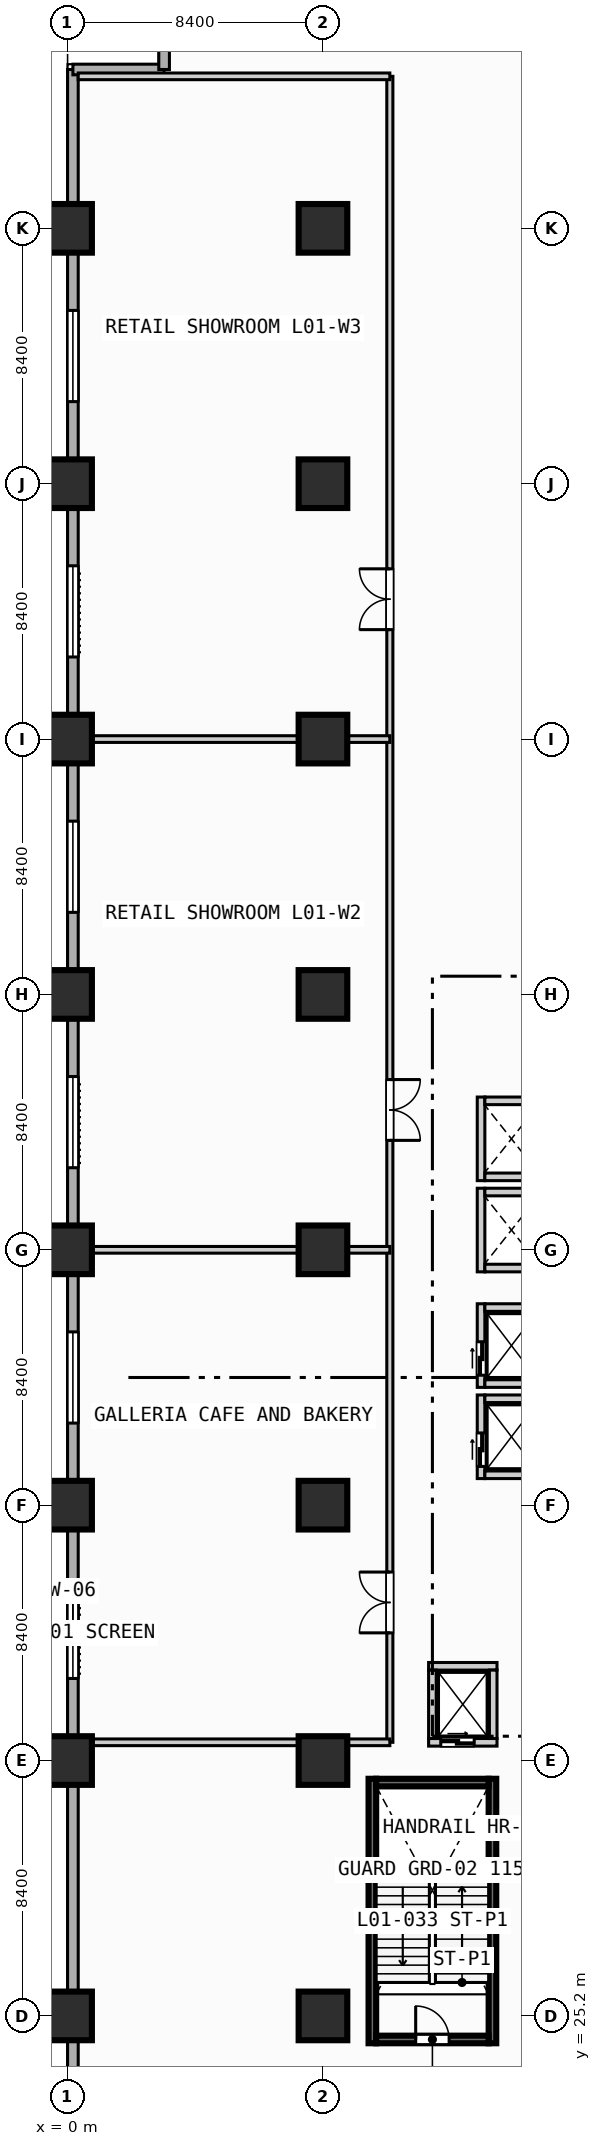
"""IFC4 building model, lengths in metres.
Left out: names, types, materials, properties, quantities, classifications, styles, units other than length and angle.
Written with IfcOpenShell. Run it as: python <this file> out.ifc"""

import sys

from ifc_helpers import new_model, si_unit, direction, frame, frame_2d, origin, origin_2d, place, context, subcontext, project, spatial, rectangle, extrude, element, fill, save


model = new_model("IFC4")
c1 = context("Model", 3, precision=1e-05, world=origin(), true_north=direction((0.0, 1.0)))
c2 = subcontext(c1, "Body", "Model", "MODEL_VIEW")
j1 = project(units=[si_unit("LENGTHUNIT", "METRE"), si_unit("PLANEANGLEUNIT", "RADIAN")], contexts=[c1])
p1 = place(None, origin())
s1 = spatial("IfcSite", under=j1, at=p1, CompositionType="ELEMENT")
p2 = place(p1, origin())
s2 = spatial("IfcBuilding", under=s1, at=p2, CompositionType="ELEMENT")
p3 = place(p2, frame((0.0, 0.0, 6.0)))
s3 = spatial("IfcBuildingStorey", under=s2, at=p3, CompositionType="ELEMENT", Elevation=6.0)
for number, where, z_axis, x_axis in (
    (1, (10.025, 24.3, 0.0), (0.0, 0.0, 1.0), (0.0, 1.0, 0.0)),
    (2, (13.975, 24.3, 0.0), (0.0, 0.0, 1.0), (0.0, 1.0, 0.0)),
):
    element("IfcWall", number, at=place(p3, frame(where, z_axis=z_axis, x_axis=x_axis)), inside=s3, PredefinedType="SOLIDWALL", context=c2, shape_type="SweptSolid", body=[
        extrude(rectangle(XDim=8.7, YDim=0.25, at=frame_2d((4.35, 0.0))), origin(), (0.0, 0.0, 1.0), 4.45),
    ])
p4 = place(p3, frame((10.15, 32.875, 0.0), z_axis=(0.0, 0.0, 1.0), x_axis=(1.0, 0.0, 0.0)))
e3 = element("IfcWall", 3, at=p4, inside=s3, PredefinedType="SOLIDWALL", context=c2, shape_type="SweptSolid", body=[
    extrude(rectangle(XDim=3.7, YDim=0.25, at=frame_2d((1.85, 0.0))), origin(), (0.0, 0.0, 1.0), 4.45),
])
for number, where, z_axis, x_axis in (
    (4, (0.0, 25.2, 0.0), (0.0, 0.0, 1.0), (1.0, 0.0, 0.0)),
    (5, (0.0, 33.6, 0.0), (0.0, 0.0, 1.0), (1.0, 0.0, 0.0)),
    (6, (0.0, 42.0, 0.0), (0.0, 0.0, 1.0), (1.0, 0.0, 0.0)),
    (7, (0.0, 50.4, 0.0), (0.0, 0.0, 1.0), (1.0, 0.0, 0.0)),
    (8, (0.0, 58.8, 0.0), (0.0, 0.0, 1.0), (1.0, 0.0, 0.0)),
    (9, (0.0, 67.2, 0.0), (0.0, 0.0, 1.0), (1.0, 0.0, 0.0)),
    (10, (0.0, 75.6, 0.0), (0.0, 0.0, 1.0), (1.0, 0.0, 0.0)),
    (11, (0.0, 84.0, 0.0), (0.0, 0.0, 1.0), (1.0, 0.0, 0.0)),
    (12, (8.4, 25.2, 0.0), (0.0, 0.0, 1.0), (1.0, 0.0, 0.0)),
    (13, (8.4, 33.6, 0.0), (0.0, 0.0, 1.0), (1.0, 0.0, 0.0)),
    (14, (8.4, 42.0, 0.0), (0.0, 0.0, 1.0), (1.0, 0.0, 0.0)),
    (15, (8.4, 50.4, 0.0), (0.0, 0.0, 1.0), (1.0, 0.0, 0.0)),
    (16, (8.4, 58.8, 0.0), (0.0, 0.0, 1.0), (1.0, 0.0, 0.0)),
    (17, (8.4, 67.2, 0.0), (0.0, 0.0, 1.0), (1.0, 0.0, 0.0)),
    (18, (8.4, 75.6, 0.0), (0.0, 0.0, 1.0), (1.0, 0.0, 0.0)),
    (19, (8.4, 84.0, 0.0), (0.0, 0.0, 1.0), (1.0, 0.0, 0.0)),
):
    element("IfcColumn", number, at=place(p3, frame(where, z_axis=z_axis, x_axis=x_axis)), inside=s3, PredefinedType="COLUMN", context=c2, shape_type="SweptSolid", body=[
        extrude(rectangle(XDim=1.6, YDim=1.6, at=origin_2d()), origin(), (0.0, 0.0, 1.0), 4.8),
    ])
p5 = place(p3, frame((0.175, 3.175, 0.0), z_axis=(0.0, 0.0, 1.0), x_axis=(0.0, 1.0, 0.0)))
e20 = element("IfcWall", 20, at=p5, inside=s3, PredefinedType="STANDARD", context=c2, shape_type="SweptSolid", body=[
    extrude(rectangle(XDim=86.05, YDim=0.35, at=frame_2d((43.025, 0.0))), origin(), (0.0, 0.0, 1.0), 4.45),
])
p6 = place(p5, frame((33.125, 0.0, 0.85)))
e21 = element("IfcOpeningElement", 21, at=p6, cuts=e20, PredefinedType="OPENING", context=c2, shape_type="SweptSolid", body=[
    extrude(rectangle(XDim=3.0, YDim=2.4, at=frame_2d((1.5, 1.2))), frame((0.0, 0.185, 0.0), z_axis=(0.0, -1.0, 0.0), x_axis=(1.0, 0.0, 0.0)), (0.0, 0.0, 1.0), 0.37),
])
p7 = place(p5, frame((41.525, 0.0, 0.85)))
e22 = element("IfcOpeningElement", 22, at=p7, cuts=e20, PredefinedType="OPENING", context=c2, shape_type="SweptSolid", body=[
    extrude(rectangle(XDim=3.0, YDim=2.4, at=frame_2d((1.5, 1.2))), frame((0.0, 0.185, 0.0), z_axis=(0.0, -1.0, 0.0), x_axis=(1.0, 0.0, 0.0)), (0.0, 0.0, 1.0), 0.37),
])
p8 = place(p5, frame((49.925, 0.0, 0.85)))
e23 = element("IfcOpeningElement", 23, at=p8, cuts=e20, PredefinedType="OPENING", context=c2, shape_type="SweptSolid", body=[
    extrude(rectangle(XDim=3.0, YDim=2.4, at=frame_2d((1.5, 1.2))), frame((0.0, 0.185, 0.0), z_axis=(0.0, -1.0, 0.0), x_axis=(1.0, 0.0, 0.0)), (0.0, 0.0, 1.0), 0.37),
])
p9 = place(p5, frame((58.325, 0.0, 0.85)))
e24 = element("IfcOpeningElement", 24, at=p9, cuts=e20, PredefinedType="OPENING", context=c2, shape_type="SweptSolid", body=[
    extrude(rectangle(XDim=3.0, YDim=2.4, at=frame_2d((1.5, 1.2))), frame((0.0, 0.185, 0.0), z_axis=(0.0, -1.0, 0.0), x_axis=(1.0, 0.0, 0.0)), (0.0, 0.0, 1.0), 0.37),
])
p10 = place(p5, frame((66.725, 0.0, 0.85)))
e25 = element("IfcOpeningElement", 25, at=p10, cuts=e20, PredefinedType="OPENING", context=c2, shape_type="SweptSolid", body=[
    extrude(rectangle(XDim=3.0, YDim=2.4, at=frame_2d((1.5, 1.2))), frame((0.0, 0.185, 0.0), z_axis=(0.0, -1.0, 0.0), x_axis=(1.0, 0.0, 0.0)), (0.0, 0.0, 1.0), 0.37),
])
p11 = place(p5, frame((75.125, 0.0, 0.85)))
e26 = element("IfcOpeningElement", 26, at=p11, cuts=e20, PredefinedType="OPENING", context=c2, shape_type="SweptSolid", body=[
    extrude(rectangle(XDim=3.0, YDim=2.4, at=frame_2d((1.5, 1.2))), frame((0.0, 0.185, 0.0), z_axis=(0.0, -1.0, 0.0), x_axis=(1.0, 0.0, 0.0)), (0.0, 0.0, 1.0), 0.37),
])
for number, where, z_axis, x_axis in (
    (27, (0.175, 89.225, 0.0), (0.0, 0.0, 1.0), (1.0, 0.0, 0.0)),
    (28, (3.175, 89.225, 0.0), (0.0, 0.0, 1.0), (0.0, 1.0, 0.0)),
):
    element("IfcWall", number, at=place(p3, frame(where, z_axis=z_axis, x_axis=x_axis)), inside=s3, PredefinedType="STANDARD", context=c2, shape_type="SweptSolid", body=[
        extrude(rectangle(XDim=3.0, YDim=0.35, at=frame_2d((1.5, 0.0))), origin(), (0.0, 0.0, 1.0), 4.45),
    ])
p12 = place(p3, frame((11.875, 34.2, 0.0), z_axis=(0.0, 0.0, 1.0), x_axis=(1.0, 0.0, 0.0)))
e29 = element("IfcWall", 29, at=p12, inside=s3, PredefinedType="SOLIDWALL", context=c2, shape_type="SweptSolid", body=[
    extrude(rectangle(XDim=2.25, YDim=0.25, at=frame_2d((1.125, 0.0))), origin(), (0.0, 0.0, 1.0), 4.45),
])
p13 = place(p12, frame((0.4, 0.0, 0.0)))
e30 = element("IfcOpeningElement", 30, at=p13, cuts=e29, PredefinedType="OPENING", context=c2, shape_type="SweptSolid", body=[
    extrude(rectangle(XDim=1.1, YDim=2.15, at=frame_2d((0.55, 1.075))), frame((0.0, 0.135, 0.0), z_axis=(0.0, -1.0, 0.0), x_axis=(1.0, 0.0, 0.0)), (0.0, 0.0, 1.0), 0.27),
])
for number, where, z_axis, x_axis in (
    (31, (11.875, 36.7, 0.0), (0.0, 0.0, 1.0), (1.0, 0.0, 0.0)),
    (32, (12.0, 34.325, 0.0), (0.0, 0.0, 1.0), (0.0, 1.0, 0.0)),
    (33, (14.0, 34.325, 0.0), (0.0, 0.0, 1.0), (0.0, 1.0, 0.0)),
):
    element("IfcWall", number, at=place(p3, frame(where, z_axis=z_axis, x_axis=x_axis)), inside=s3, PredefinedType="SOLIDWALL", context=c2, shape_type="SweptSolid", body=[
        extrude(rectangle(XDim=2.25, YDim=0.25, at=frame_2d((1.125, 0.0))), origin(), (0.0, 0.0, 1.0), 4.45),
    ])
p14 = place(p3, frame((13.6, 42.875, 0.0), z_axis=(0.0, 0.0, 1.0), x_axis=(0.0, 1.0, 0.0)))
e34 = element("IfcWall", 34, at=p14, inside=s3, PredefinedType="SOLIDWALL", context=c2, shape_type="SweptSolid", body=[
    extrude(rectangle(XDim=2.75, YDim=0.25, at=frame_2d((1.375, 0.0))), origin(), (0.0, 0.0, 1.0), 4.45),
])
p15 = place(p14, frame((0.4, 0.0, 0.0)))
e35 = element("IfcOpeningElement", 35, at=p15, cuts=e34, PredefinedType="OPENING", context=c2, shape_type="SweptSolid", body=[
    extrude(rectangle(XDim=1.1, YDim=2.15, at=frame_2d((0.55, 1.075))), frame((0.0, 0.135, 0.0), z_axis=(0.0, -1.0, 0.0), x_axis=(1.0, 0.0, 0.0)), (0.0, 0.0, 1.0), 0.27),
])
for number, where, z_axis, x_axis in (
    (36, (13.725, 43.0, 0.0), (0.0, 0.0, 1.0), (1.0, 0.0, 0.0)),
    (37, (13.725, 45.5, 0.0), (0.0, 0.0, 1.0), (1.0, 0.0, 0.0)),
):
    element("IfcWall", number, at=place(p3, frame(where, z_axis=z_axis, x_axis=x_axis)), inside=s3, PredefinedType="SOLIDWALL", context=c2, shape_type="SweptSolid", body=[
        extrude(rectangle(XDim=1.75, YDim=0.25, at=frame_2d((0.875, 0.0))), origin(), (0.0, 0.0, 1.0), 4.45),
    ])
p16 = place(p3, frame((13.6, 45.875, 0.0), z_axis=(0.0, 0.0, 1.0), x_axis=(0.0, 1.0, 0.0)))
e38 = element("IfcWall", 38, at=p16, inside=s3, PredefinedType="SOLIDWALL", context=c2, shape_type="SweptSolid", body=[
    extrude(rectangle(XDim=2.75, YDim=0.25, at=frame_2d((1.375, 0.0))), origin(), (0.0, 0.0, 1.0), 4.45),
])
p17 = place(p16, frame((0.4, 0.0, 0.0)))
e39 = element("IfcOpeningElement", 39, at=p17, cuts=e38, PredefinedType="OPENING", context=c2, shape_type="SweptSolid", body=[
    extrude(rectangle(XDim=1.1, YDim=2.15, at=frame_2d((0.55, 1.075))), frame((0.0, 0.135, 0.0), z_axis=(0.0, -1.0, 0.0), x_axis=(1.0, 0.0, 0.0)), (0.0, 0.0, 1.0), 0.27),
])
for number, where, z_axis, x_axis in (
    (40, (13.725, 46.0, 0.0), (0.0, 0.0, 1.0), (1.0, 0.0, 0.0)),
    (41, (13.725, 48.5, 0.0), (0.0, 0.0, 1.0), (1.0, 0.0, 0.0)),
):
    element("IfcWall", number, at=place(p3, frame(where, z_axis=z_axis, x_axis=x_axis)), inside=s3, PredefinedType="SOLIDWALL", context=c2, shape_type="SweptSolid", body=[
        extrude(rectangle(XDim=1.75, YDim=0.25, at=frame_2d((0.875, 0.0))), origin(), (0.0, 0.0, 1.0), 4.45),
    ])
p18 = place(p3, frame((13.6, 49.675, 0.0), z_axis=(0.0, 0.0, 1.0), x_axis=(0.0, 1.0, 0.0)))
e42 = element("IfcWall", 42, at=p18, inside=s3, PredefinedType="SOLIDWALL", context=c2, shape_type="SweptSolid", body=[
    extrude(rectangle(XDim=2.75, YDim=0.25, at=frame_2d((1.375, 0.0))), origin(), (0.0, 0.0, 1.0), 4.45),
])
for number, where, z_axis, x_axis in (
    (43, (13.725, 49.8, 0.0), (0.0, 0.0, 1.0), (1.0, 0.0, 0.0)),
    (44, (13.725, 52.3, 0.0), (0.0, 0.0, 1.0), (1.0, 0.0, 0.0)),
):
    element("IfcWall", number, at=place(p3, frame(where, z_axis=z_axis, x_axis=x_axis)), inside=s3, PredefinedType="SOLIDWALL", context=c2, shape_type="SweptSolid", body=[
        extrude(rectangle(XDim=1.75, YDim=0.25, at=frame_2d((0.875, 0.0))), origin(), (0.0, 0.0, 1.0), 4.45),
    ])
p19 = place(p3, frame((13.6, 52.675, 0.0), z_axis=(0.0, 0.0, 1.0), x_axis=(0.0, 1.0, 0.0)))
e45 = element("IfcWall", 45, at=p19, inside=s3, PredefinedType="SOLIDWALL", context=c2, shape_type="SweptSolid", body=[
    extrude(rectangle(XDim=2.75, YDim=0.25, at=frame_2d((1.375, 0.0))), origin(), (0.0, 0.0, 1.0), 4.45),
])
for number, where, z_axis, x_axis in (
    (46, (13.725, 52.8, 0.0), (0.0, 0.0, 1.0), (1.0, 0.0, 0.0)),
    (47, (13.725, 55.3, 0.0), (0.0, 0.0, 1.0), (1.0, 0.0, 0.0)),
):
    element("IfcWall", number, at=place(p3, frame(where, z_axis=z_axis, x_axis=x_axis)), inside=s3, PredefinedType="SOLIDWALL", context=c2, shape_type="SweptSolid", body=[
        extrude(rectangle(XDim=1.75, YDim=0.25, at=frame_2d((0.875, 0.0))), origin(), (0.0, 0.0, 1.0), 4.45),
    ])
p20 = place(p3, frame((10.15, 24.425, 0.0), z_axis=(0.0, 0.0, 1.0), x_axis=(1.0, 0.0, 0.0)))
e48 = element("IfcWall", 48, at=p20, inside=s3, PredefinedType="SOLIDWALL", context=c2, shape_type="SweptSolid", body=[
    extrude(rectangle(XDim=3.7, YDim=0.25, at=frame_2d((1.85, 0.0))), origin(), (0.0, 0.0, 1.0), 4.45),
])
p21 = place(p20, frame((1.3, 0.0, 0.0)))
e49 = element("IfcOpeningElement", 49, at=p21, cuts=e48, PredefinedType="OPENING", context=c2, shape_type="SweptSolid", body=[
    extrude(rectangle(XDim=1.1, YDim=2.15, at=frame_2d((0.55, 1.075))), frame((0.0, 0.135, 0.0), z_axis=(0.0, -1.0, 0.0), x_axis=(1.0, 0.0, 0.0)), (0.0, 0.0, 1.0), 0.27),
])
p22 = place(p3, frame((10.6, 34.2, 0.0), z_axis=(0.0, 0.0, 1.0), x_axis=(0.0, 1.0, 0.0)))
e50 = element("IfcWall", 50, at=p22, inside=s3, PredefinedType="PARTITIONING", context=c2, shape_type="SweptSolid", body=[
    extrude(rectangle(XDim=54.8, YDim=0.2, at=frame_2d((27.4, 0.0))), origin(), (0.0, 0.0, 1.0), 4.45),
])
p23 = place(p22, frame((3.6, 0.0, 0.0)))
e51 = element("IfcOpeningElement", 51, at=p23, cuts=e50, PredefinedType="OPENING", context=c2, shape_type="SweptSolid", body=[
    extrude(rectangle(XDim=2.0, YDim=2.15, at=frame_2d((1.0, 1.075))), frame((0.0, 0.11, 0.0), z_axis=(0.0, -1.0, 0.0), x_axis=(1.0, 0.0, 0.0)), (0.0, 0.0, 1.0), 0.22),
])
p24 = place(p22, frame((19.8, 0.0, 0.0)))
e52 = element("IfcOpeningElement", 52, at=p24, cuts=e50, PredefinedType="OPENING", context=c2, shape_type="SweptSolid", body=[
    extrude(rectangle(XDim=2.0, YDim=2.15, at=frame_2d((1.0, 1.075))), frame((0.0, 0.11, 0.0), z_axis=(0.0, -1.0, 0.0), x_axis=(1.0, 0.0, 0.0)), (0.0, 0.0, 1.0), 0.22),
])
p25 = place(p22, frame((36.6, 0.0, 0.0)))
e53 = element("IfcOpeningElement", 53, at=p25, cuts=e50, PredefinedType="OPENING", context=c2, shape_type="SweptSolid", body=[
    extrude(rectangle(XDim=2.0, YDim=2.15, at=frame_2d((1.0, 1.075))), frame((0.0, 0.11, 0.0), z_axis=(0.0, -1.0, 0.0), x_axis=(1.0, 0.0, 0.0)), (0.0, 0.0, 1.0), 0.22),
])
p26 = place(p3, frame((0.35, 34.2, 0.0), z_axis=(0.0, 0.0, 1.0), x_axis=(1.0, 0.0, 0.0)))
e54 = element("IfcWall", 54, at=p26, inside=s3, PredefinedType="PARTITIONING", context=c2, shape_type="SweptSolid", body=[
    extrude(rectangle(XDim=10.25, YDim=0.22, at=frame_2d((5.125, 0.0))), origin(), (0.0, 0.0, 1.0), 4.45),
])
p27 = place(p3, frame((0.35, 50.4, 0.0), z_axis=(0.0, 0.0, 1.0), x_axis=(1.0, 0.0, 0.0)))
e55 = element("IfcWall", 55, at=p27, inside=s3, PredefinedType="PARTITIONING", context=c2, shape_type="SweptSolid", body=[
    extrude(rectangle(XDim=10.25, YDim=0.22, at=frame_2d((5.125, 0.0))), origin(), (0.0, 0.0, 1.0), 3.833),
])
p28 = place(p3, frame((0.35, 67.2, 0.0), z_axis=(0.0, 0.0, 1.0), x_axis=(1.0, 0.0, 0.0)))
e56 = element("IfcWall", 56, at=p28, inside=s3, PredefinedType="PARTITIONING", context=c2, shape_type="SweptSolid", body=[
    extrude(rectangle(XDim=10.25, YDim=0.22, at=frame_2d((5.125, 0.0))), origin(), (0.0, 0.0, 1.0), 3.6),
])
p29 = place(p3, frame((0.35, 89.0, 0.0), z_axis=(0.0, 0.0, 1.0), x_axis=(1.0, 0.0, 0.0)))
e57 = element("IfcWall", 57, at=p29, inside=s3, PredefinedType="PARTITIONING", context=c2, shape_type="SweptSolid", body=[
    extrude(rectangle(XDim=10.25, YDim=0.22, at=frame_2d((5.125, 0.0))), origin(), (0.0, 0.0, 1.0), 4.45),
])
p30 = place(p6, origin())
e58 = element("IfcWindow", 58, at=p30, inside=s3, PartitioningType="SINGLE_PANEL", PredefinedType="WINDOW", context=c2, shape_type="SweptSolid", body=[
    extrude(rectangle(XDim=3.0, YDim=2.4, at=frame_2d((1.5, 1.2))), frame((0.0, 0.03, 0.0), z_axis=(0.0, -1.0, 0.0), x_axis=(1.0, 0.0, 0.0)), (0.0, 0.0, 1.0), 0.06),
])
fill(e21, e58)
p31 = place(p7, origin())
e59 = element("IfcWindow", 59, at=p31, inside=s3, PartitioningType="SINGLE_PANEL", PredefinedType="WINDOW", context=c2, shape_type="SweptSolid", body=[
    extrude(rectangle(XDim=3.0, YDim=2.4, at=frame_2d((1.5, 1.2))), frame((0.0, 0.03, 0.0), z_axis=(0.0, -1.0, 0.0), x_axis=(1.0, 0.0, 0.0)), (0.0, 0.0, 1.0), 0.06),
])
fill(e22, e59)
p32 = place(p8, origin())
e60 = element("IfcWindow", 60, at=p32, inside=s3, PartitioningType="SINGLE_PANEL", PredefinedType="WINDOW", context=c2, shape_type="SweptSolid", body=[
    extrude(rectangle(XDim=3.0, YDim=2.4, at=frame_2d((1.5, 1.2))), frame((0.0, 0.03, 0.0), z_axis=(0.0, -1.0, 0.0), x_axis=(1.0, 0.0, 0.0)), (0.0, 0.0, 1.0), 0.06),
])
fill(e23, e60)
p33 = place(p9, origin())
e61 = element("IfcWindow", 61, at=p33, inside=s3, PartitioningType="SINGLE_PANEL", PredefinedType="WINDOW", context=c2, shape_type="SweptSolid", body=[
    extrude(rectangle(XDim=3.0, YDim=2.4, at=frame_2d((1.5, 1.2))), frame((0.0, 0.03, 0.0), z_axis=(0.0, -1.0, 0.0), x_axis=(1.0, 0.0, 0.0)), (0.0, 0.0, 1.0), 0.06),
])
fill(e24, e61)
p34 = place(p10, origin())
e62 = element("IfcWindow", 62, at=p34, inside=s3, PartitioningType="SINGLE_PANEL", PredefinedType="WINDOW", context=c2, shape_type="SweptSolid", body=[
    extrude(rectangle(XDim=3.0, YDim=2.4, at=frame_2d((1.5, 1.2))), frame((0.0, 0.03, 0.0), z_axis=(0.0, -1.0, 0.0), x_axis=(1.0, 0.0, 0.0)), (0.0, 0.0, 1.0), 0.06),
])
fill(e25, e62)
p35 = place(p11, origin())
e63 = element("IfcWindow", 63, at=p35, inside=s3, PartitioningType="SINGLE_PANEL", PredefinedType="WINDOW", context=c2, shape_type="SweptSolid", body=[
    extrude(rectangle(XDim=3.0, YDim=2.4, at=frame_2d((1.5, 1.2))), frame((0.0, 0.03, 0.0), z_axis=(0.0, -1.0, 0.0), x_axis=(1.0, 0.0, 0.0)), (0.0, 0.0, 1.0), 0.06),
])
fill(e26, e63)
p36 = place(p13, origin())
e64 = element("IfcDoor", 64, at=p36, inside=s3, OperationType="SLIDING_TO_LEFT", PredefinedType="DOOR", context=c2, shape_type="SweptSolid", body=[
    extrude(rectangle(XDim=1.1, YDim=2.15, at=frame_2d((0.55, 1.075))), frame((0.0, 0.025, 0.0), z_axis=(0.0, -1.0, 0.0), x_axis=(1.0, 0.0, 0.0)), (0.0, 0.0, 1.0), 0.05),
])
fill(e30, e64)
p37 = place(p15, origin())
e65 = element("IfcDoor", 65, at=p37, inside=s3, OperationType="SLIDING_TO_LEFT", PredefinedType="DOOR", context=c2, shape_type="SweptSolid", body=[
    extrude(rectangle(XDim=1.1, YDim=2.15, at=frame_2d((0.55, 1.075))), frame((0.0, 0.025, 0.0), z_axis=(0.0, -1.0, 0.0), x_axis=(1.0, 0.0, 0.0)), (0.0, 0.0, 1.0), 0.05),
])
fill(e35, e65)
p38 = place(p17, origin())
e66 = element("IfcDoor", 66, at=p38, inside=s3, OperationType="SLIDING_TO_LEFT", PredefinedType="DOOR", context=c2, shape_type="SweptSolid", body=[
    extrude(rectangle(XDim=1.1, YDim=2.15, at=frame_2d((0.55, 1.075))), frame((0.0, 0.025, 0.0), z_axis=(0.0, -1.0, 0.0), x_axis=(1.0, 0.0, 0.0)), (0.0, 0.0, 1.0), 0.05),
])
fill(e39, e66)
p39 = place(p21, origin())
e67 = element("IfcDoor", 67, at=p39, inside=s3, OperationType="SINGLE_SWING_LEFT", PredefinedType="DOOR", context=c2, shape_type="SweptSolid", body=[
    extrude(rectangle(XDim=1.1, YDim=2.15, at=frame_2d((0.55, 1.075))), frame((0.0, 0.025, 0.0), z_axis=(0.0, -1.0, 0.0), x_axis=(1.0, 0.0, 0.0)), (0.0, 0.0, 1.0), 0.05),
])
fill(e49, e67)
p40 = place(p23, origin())
e68 = element("IfcDoor", 68, at=p40, inside=s3, OperationType="SINGLE_SWING_LEFT", PredefinedType="DOOR", context=c2, shape_type="SweptSolid", body=[
    extrude(rectangle(XDim=2.0, YDim=2.15, at=frame_2d((1.0, 1.075))), frame((0.0, 0.025, 0.0), z_axis=(0.0, -1.0, 0.0), x_axis=(1.0, 0.0, 0.0)), (0.0, 0.0, 1.0), 0.05),
])
fill(e51, e68)
p41 = place(p24, origin())
e69 = element("IfcDoor", 69, at=p41, inside=s3, OperationType="SINGLE_SWING_RIGHT", PredefinedType="DOOR", context=c2, shape_type="SweptSolid", body=[
    extrude(rectangle(XDim=2.0, YDim=2.15, at=frame_2d((1.0, 1.075))), frame((0.0, 0.025, 0.0), z_axis=(0.0, -1.0, 0.0), x_axis=(1.0, 0.0, 0.0)), (0.0, 0.0, 1.0), 0.05),
])
fill(e52, e69)
p42 = place(p25, origin())
e70 = element("IfcDoor", 70, at=p42, inside=s3, OperationType="SINGLE_SWING_LEFT", PredefinedType="DOOR", context=c2, shape_type="SweptSolid", body=[
    extrude(rectangle(XDim=2.0, YDim=2.15, at=frame_2d((1.0, 1.075))), frame((0.0, 0.025, 0.0), z_axis=(0.0, -1.0, 0.0), x_axis=(1.0, 0.0, 0.0)), (0.0, 0.0, 1.0), 0.05),
])
fill(e53, e70)
save(model, sys.argv[1])
